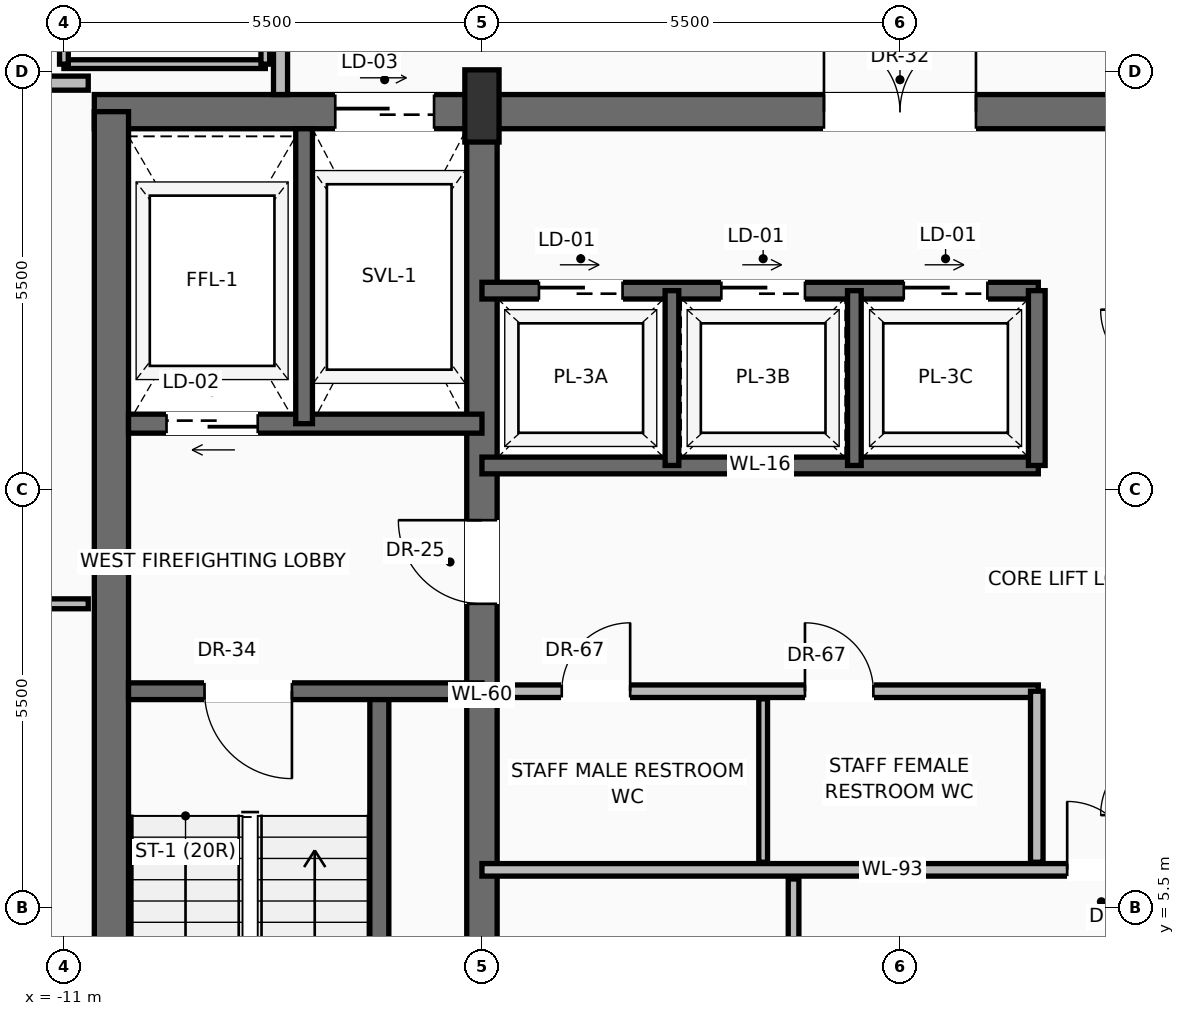
"""IFC4 building model, lengths in metres.
Left out: names, types, materials, properties, quantities, classifications, styles, units other than length and angle.
Written with IfcOpenShell. Run it as: python <this file> out.ifc"""

import sys

from ifc_helpers import new_model, si_unit, direction, frame, frame_2d, origin, origin_2d, place, context, subcontext, project, spatial, rectangle, extrude, source, transform, mapped, element, fill, save


model = new_model("IFC4")
c1 = context("Model", 3, precision=1e-05, world=origin(), true_north=direction((0.0, 1.0)))
c2 = subcontext(c1, "Body", "Model", "MODEL_VIEW")
j1 = project(units=[si_unit("LENGTHUNIT", "METRE"), si_unit("PLANEANGLEUNIT", "RADIAN")], contexts=[c1])
p1 = place(None, origin())
s1 = spatial("IfcSite", under=j1, at=p1, CompositionType="ELEMENT")
p2 = place(p1, origin())
s2 = spatial("IfcBuilding", under=s1, at=p2, CompositionType="ELEMENT")
p3 = place(p2, frame((0.0, 0.0, 297.15)))
s3 = spatial("IfcBuildingStorey", under=s2, at=p3, CompositionType="ELEMENT", Elevation=297.15)
p4 = place(p3, frame((-10.6, 15.975, 0.0), z_axis=(0.0, 0.0, 1.0), x_axis=(1.0, 0.0, 0.0)))
e1 = element("IfcWall", 1, at=p4, inside=s3, PredefinedType="SHEAR", context=c2, shape_type="SweptSolid", body=[
    extrude(rectangle(XDim=21.2, YDim=0.45, at=frame_2d((10.6, 0.0))), origin(), (0.0, 0.0, 1.0), 3.24),
])
p5 = place(p4, frame((3.17, 0.0, 0.0)))
e2 = element("IfcOpeningElement", 2, at=p5, cuts=e1, PredefinedType="OPENING", context=c2, shape_type="SweptSolid", body=[
    extrude(rectangle(XDim=1.3, YDim=2.3, at=frame_2d((0.65, 1.15))), frame((0.0, 0.235, 0.0), z_axis=(0.0, -1.0, 0.0), x_axis=(1.0, 0.0, 0.0)), (0.0, 0.0, 1.0), 0.47),
])
p6 = place(p4, frame((9.6, 0.0, 0.0)))
e3 = element("IfcOpeningElement", 3, at=p6, cuts=e1, PredefinedType="OPENING", context=c2, shape_type="SweptSolid", body=[
    extrude(rectangle(XDim=2.0, YDim=2.4, at=frame_2d((1.0, 1.2))), frame((0.0, 0.235, 0.0), z_axis=(0.0, -1.0, 0.0), x_axis=(1.0, 0.0, 0.0)), (0.0, 0.0, 1.0), 0.47),
])
p7 = place(p3, frame((-10.375, 0.625, 0.0), z_axis=(0.0, 0.0, 1.0), x_axis=(0.0, 1.0, 0.0)))
e4 = element("IfcWall", 4, at=p7, inside=s3, PredefinedType="SHEAR", context=c2, shape_type="SweptSolid", body=[
    extrude(rectangle(XDim=15.35, YDim=0.45, at=frame_2d((7.675, 0.0))), origin(), (0.0, 0.0, 1.0), 3.24),
])
p8 = place(p3, frame((-5.5, 0.625, 0.0), z_axis=(0.0, 0.0, 1.0), x_axis=(0.0, 1.0, 0.0)))
e5 = element("IfcWall", 5, at=p8, inside=s3, PredefinedType="SHEAR", context=c2, shape_type="SweptSolid", body=[
    extrude(rectangle(XDim=15.35, YDim=0.4, at=frame_2d((7.675, 0.0))), origin(), (0.0, 0.0, 1.0), 3.24),
])
p9 = place(p8, frame((8.875, 0.0, 0.0)))
e6 = element("IfcOpeningElement", 6, at=p9, cuts=e5, PredefinedType="OPENING", context=c2, shape_type="SweptSolid", body=[
    extrude(rectangle(XDim=1.1, YDim=2.2, at=frame_2d((0.55, 1.1))), frame((0.0, 0.21, 0.0), z_axis=(0.0, -1.0, 0.0), x_axis=(1.0, 0.0, 0.0)), (0.0, 0.0, 1.0), 0.42),
])
m1 = source(origin(), c2, "Body", "SweptSolid", [
    extrude(rectangle(XDim=0.45, YDim=0.95, at=origin_2d()), origin(), (0.0, 0.0, 1.0), 3.45),
])
p10 = place(p3, frame((-5.5, 16.05, 0.0), z_axis=(0.0, 0.0, 1.0), x_axis=(1.0, 0.0, 0.0)))
e7 = element("IfcColumn", 7, at=p10, inside=s3, PredefinedType="PILASTER", context=c2, shape_type="MappedRepresentation", body=[
    mapped(m1, transform((0.0, 0.0, 0.0), scale=1.0)),
])
p11 = place(p3, frame((-17.857, 13.76, 0.0), z_axis=(0.0, 0.0, 1.0), x_axis=(0.497115564006, 0.867684341234, 0.0)))
e8 = element("IfcWall", 8, at=p11, inside=s3, PredefinedType="SOLIDWALL", context=c2, shape_type="SweptSolid", body=[
    extrude(rectangle(XDim=20.373, YDim=0.28, at=frame_2d((10.187, 0.0))), origin(), (0.0, 0.0, 1.0), 2.82),
])
p12 = place(p11, frame((4.889, 0.0, 0.0)))
e9 = element("IfcOpeningElement", 9, at=p12, cuts=e8, PredefinedType="OPENING", context=c2, shape_type="SweptSolid", body=[
    extrude(rectangle(XDim=1.6, YDim=2.35, at=frame_2d((0.8, 1.175))), frame((0.0, 0.15, 0.0), z_axis=(0.0, -1.0, 0.0), x_axis=(1.0, 0.0, 0.0)), (0.0, 0.0, 1.0), 0.3),
])
p13 = place(p11, frame((13.854, 0.0, 0.9)))
e10 = element("IfcOpeningElement", 10, at=p13, cuts=e8, PredefinedType="OPENING", context=c2, shape_type="SweptSolid", body=[
    extrude(rectangle(XDim=2.0, YDim=1.75, at=frame_2d((1.0, 0.875))), frame((0.0, 0.15, 0.0), z_axis=(0.0, -1.0, 0.0), x_axis=(1.0, 0.0, 0.0)), (0.0, 0.0, 1.0), 0.3),
])
p14 = place(p3, frame((-6.85, 0.85, 0.0), z_axis=(0.0, 0.0, 1.0), x_axis=(0.0, 1.0, 0.0)))
e11 = element("IfcWall", 11, at=p14, inside=s3, PredefinedType="SOLIDWALL", context=c2, shape_type="SweptSolid", body=[
    extrude(rectangle(XDim=7.5, YDim=0.25, at=frame_2d((3.75, 0.0))), origin(), (0.0, 0.0, 1.0), 3.24),
])
p15 = place(p3, frame((-5.5, 8.35, 0.0), z_axis=(0.0, 0.0, 1.0), x_axis=(-1.0, 0.0, 0.0)))
e12 = element("IfcWall", 12, at=p15, inside=s3, PredefinedType="SOLIDWALL", context=c2, shape_type="SweptSolid", body=[
    extrude(rectangle(XDim=4.65, YDim=0.22, at=frame_2d((2.325, 0.0))), origin(), (0.0, 0.0, 1.0), 3.24),
])
p16 = place(p15, frame((2.5, 0.0, 0.0)))
e13 = element("IfcOpeningElement", 13, at=p16, cuts=e12, PredefinedType="OPENING", context=c2, shape_type="SweptSolid", body=[
    extrude(rectangle(XDim=1.15, YDim=2.2, at=frame_2d((0.575, 1.1))), frame((0.0, 0.12, 0.0), z_axis=(0.0, -1.0, 0.0), x_axis=(1.0, 0.0, 0.0)), (0.0, 0.0, 1.0), 0.24),
])
p17 = place(p3, frame((-5.5, 11.87, 0.0), z_axis=(0.0, 0.0, 1.0), x_axis=(-1.0, 0.0, 0.0)))
e14 = element("IfcWall", 14, at=p17, inside=s3, PredefinedType="SOLIDWALL", context=c2, shape_type="SweptSolid", body=[
    extrude(rectangle(XDim=4.65, YDim=0.25, at=frame_2d((2.325, 0.0))), origin(), (0.0, 0.0, 1.0), 3.24),
])
p18 = place(p17, frame((2.95, 0.0, 0.0)))
e15 = element("IfcOpeningElement", 15, at=p18, cuts=e14, PredefinedType="OPENING", context=c2, shape_type="SweptSolid", body=[
    extrude(rectangle(XDim=1.2, YDim=2.25, at=frame_2d((0.6, 1.125))), frame((0.0, 0.135, 0.0), z_axis=(0.0, -1.0, 0.0), x_axis=(1.0, 0.0, 0.0)), (0.0, 0.0, 1.0), 0.27),
])
p19 = place(p3, frame((-7.84, 11.87, 0.0), z_axis=(0.0, 0.0, 1.0), x_axis=(0.0, 1.0, 0.0)))
e16 = element("IfcWall", 16, at=p19, inside=s3, PredefinedType="SOLIDWALL", context=c2, shape_type="SweptSolid", body=[
    extrude(rectangle(XDim=3.88, YDim=0.22, at=frame_2d((1.94, 0.0))), origin(), (0.0, 0.0, 1.0), 3.24),
])
p20 = place(p3, frame((-5.5, 6.0, 0.0), z_axis=(0.0, 0.0, 1.0), x_axis=(1.0, 0.0, 0.0)))
e17 = element("IfcWall", 17, at=p20, inside=s3, PredefinedType="PARTITIONING", context=c2, shape_type="SweptSolid", body=[
    extrude(rectangle(XDim=10.8, YDim=0.165, at=frame_2d((5.4, 0.0))), origin(), (0.0, 0.0, 1.0), 3.232),
])
p21 = place(p20, frame((7.7, 0.0, 0.0)))
e18 = element("IfcOpeningElement", 18, at=p21, cuts=e17, PredefinedType="OPENING", context=c2, shape_type="SweptSolid", body=[
    extrude(rectangle(XDim=0.9, YDim=2.1, at=frame_2d((0.45, 1.05))), frame((0.0, 0.093, 0.0), z_axis=(0.0, -1.0, 0.0), x_axis=(1.0, 0.0, 0.0)), (0.0, 0.0, 1.0), 0.185),
])
p22 = place(p3, frame((-1.4, 0.85, 0.0), z_axis=(0.0, 0.0, 1.0), x_axis=(0.0, 1.0, 0.0)))
e19 = element("IfcWall", 19, at=p22, inside=s3, PredefinedType="PARTITIONING", context=c2, shape_type="SweptSolid", body=[
    extrude(rectangle(XDim=5.03, YDim=0.14, at=frame_2d((2.515, 0.0))), origin(), (0.0, 0.0, 1.0), 3.232),
])
p23 = place(p22, frame((2.1, 0.0, 0.0)))
e20 = element("IfcOpeningElement", 20, at=p23, cuts=e19, PredefinedType="OPENING", context=c2, shape_type="SweptSolid", body=[
    extrude(rectangle(XDim=0.9, YDim=2.1, at=frame_2d((0.45, 1.05))), frame((0.0, 0.08, 0.0), z_axis=(0.0, -1.0, 0.0), x_axis=(1.0, 0.0, 0.0)), (0.0, 0.0, 1.0), 0.16),
])
p24 = place(p3, frame((-5.3, 8.35, 0.0), z_axis=(0.0, 0.0, 1.0), x_axis=(1.0, 0.0, 0.0)))
e21 = element("IfcWall", 21, at=p24, inside=s3, PredefinedType="PARTITIONING", context=c2, shape_type="SweptSolid", body=[
    extrude(rectangle(XDim=7.12, YDim=0.165, at=frame_2d((3.56, 0.0))), origin(), (0.0, 0.0, 1.0), 3.232),
])
p25 = place(p24, frame((0.85, 0.0, 0.0)))
e22 = element("IfcOpeningElement", 22, at=p25, cuts=e21, PredefinedType="OPENING", context=c2, shape_type="SweptSolid", body=[
    extrude(rectangle(XDim=0.9, YDim=2.1, at=frame_2d((0.45, 1.05))), frame((0.0, 0.093, 0.0), z_axis=(0.0, -1.0, 0.0), x_axis=(1.0, 0.0, 0.0)), (0.0, 0.0, 1.0), 0.185),
])
p26 = place(p24, frame((4.05, 0.0, 0.0)))
e23 = element("IfcOpeningElement", 23, at=p26, cuts=e21, PredefinedType="OPENING", context=c2, shape_type="SweptSolid", body=[
    extrude(rectangle(XDim=0.9, YDim=2.1, at=frame_2d((0.45, 1.05))), frame((0.0, 0.093, 0.0), z_axis=(0.0, -1.0, 0.0), x_axis=(1.0, 0.0, 0.0)), (0.0, 0.0, 1.0), 0.185),
])
p27 = place(p3, frame((1.8, 6.1, 0.0), z_axis=(0.0, 0.0, 1.0), x_axis=(0.0, 1.0, 0.0)))
e24 = element("IfcWall", 24, at=p27, inside=s3, PredefinedType="PARTITIONING", context=c2, shape_type="SweptSolid", body=[
    extrude(rectangle(XDim=2.25, YDim=0.165, at=frame_2d((1.125, 0.0))), origin(), (0.0, 0.0, 1.0), 3.232),
])
p28 = place(p3, frame((-1.8, 6.1, 0.0), z_axis=(0.0, 0.0, 1.0), x_axis=(0.0, 1.0, 0.0)))
e25 = element("IfcWall", 25, at=p28, inside=s3, PredefinedType="PARTITIONING", context=c2, shape_type="SweptSolid", body=[
    extrude(rectangle(XDim=2.15, YDim=0.115, at=frame_2d((1.075, 0.0))), origin(), (0.0, 0.0, 1.0), 3.232),
])
p29 = place(p3, frame((-5.5, 11.32, 0.0), z_axis=(0.0, 0.0, 1.0), x_axis=(1.0, 0.0, 0.0)))
e26 = element("IfcWall", 26, at=p29, inside=s3, PredefinedType="SOLIDWALL", context=c2, shape_type="SweptSolid", body=[
    extrude(rectangle(XDim=7.32, YDim=0.22, at=frame_2d((3.66, 0.0))), origin(), (0.0, 0.0, 1.0), 3.24),
])
p30 = place(p3, frame((-5.5, 13.62, 0.0), z_axis=(0.0, 0.0, 1.0), x_axis=(1.0, 0.0, 0.0)))
e27 = element("IfcWall", 27, at=p30, inside=s3, PredefinedType="SOLIDWALL", context=c2, shape_type="SweptSolid", body=[
    extrude(rectangle(XDim=7.32, YDim=0.22, at=frame_2d((3.66, 0.0))), origin(), (0.0, 0.0, 1.0), 3.24),
])
p31 = place(p30, frame((0.75, 0.0, 0.0)))
e28 = element("IfcOpeningElement", 28, at=p31, cuts=e27, PredefinedType="OPENING", context=c2, shape_type="SweptSolid", body=[
    extrude(rectangle(XDim=1.1, YDim=2.2, at=frame_2d((0.55, 1.1))), frame((0.0, 0.12, 0.0), z_axis=(0.0, -1.0, 0.0), x_axis=(1.0, 0.0, 0.0)), (0.0, 0.0, 1.0), 0.24),
])
p32 = place(p30, frame((3.15, 0.0, 0.0)))
e29 = element("IfcOpeningElement", 29, at=p32, cuts=e27, PredefinedType="OPENING", context=c2, shape_type="SweptSolid", body=[
    extrude(rectangle(XDim=1.1, YDim=2.2, at=frame_2d((0.55, 1.1))), frame((0.0, 0.12, 0.0), z_axis=(0.0, -1.0, 0.0), x_axis=(1.0, 0.0, 0.0)), (0.0, 0.0, 1.0), 0.24),
])
p33 = place(p30, frame((5.55, 0.0, 0.0)))
e30 = element("IfcOpeningElement", 30, at=p33, cuts=e27, PredefinedType="OPENING", context=c2, shape_type="SweptSolid", body=[
    extrude(rectangle(XDim=1.1, YDim=2.2, at=frame_2d((0.55, 1.1))), frame((0.0, 0.12, 0.0), z_axis=(0.0, -1.0, 0.0), x_axis=(1.0, 0.0, 0.0)), (0.0, 0.0, 1.0), 0.24),
])
p34 = place(p3, frame((1.8, 11.32, 0.0), z_axis=(0.0, 0.0, 1.0), x_axis=(0.0, 1.0, 0.0)))
e31 = element("IfcWall", 31, at=p34, inside=s3, PredefinedType="SOLIDWALL", context=c2, shape_type="SweptSolid", body=[
    extrude(rectangle(XDim=2.3, YDim=0.22, at=frame_2d((1.15, 0.0))), origin(), (0.0, 0.0, 1.0), 3.24),
])
for number, where, z_axis, x_axis in (
    (32, (-3.0, 11.32, 0.0), (0.0, 0.0, 1.0), (0.0, 1.0, 0.0)),
    (33, (-0.6, 11.32, 0.0), (0.0, 0.0, 1.0), (0.0, 1.0, 0.0)),
):
    element("IfcWall", number, at=place(p3, frame(where, z_axis=z_axis, x_axis=x_axis)), inside=s3, PredefinedType="SOLIDWALL", context=c2, shape_type="SweptSolid", body=[
        extrude(rectangle(XDim=2.3, YDim=0.18, at=frame_2d((1.15, 0.0))), origin(), (0.0, 0.0, 1.0), 3.24),
    ])
p35 = place(p3, frame((-8.15, 16.2, 0.0), z_axis=(0.0, 0.0, 1.0), x_axis=(0.0, 1.0, 0.0)))
e34 = element("IfcWall", 34, at=p35, inside=s3, PredefinedType="PARTITIONING", context=c2, shape_type="SweptSolid", body=[
    extrude(rectangle(XDim=13.6, YDim=0.185, at=frame_2d((6.8, 0.0))), origin(), (0.0, 0.0, 1.0), 3.232),
])
p36 = place(p35, frame((3.235, 0.0, 0.0)))
e35 = element("IfcOpeningElement", 35, at=p36, cuts=e34, PredefinedType="OPENING", context=c2, shape_type="SweptSolid", body=[
    extrude(rectangle(XDim=1.05, YDim=2.25, at=frame_2d((0.525, 1.125))), frame((0.0, 0.103, 0.0), z_axis=(0.0, -1.0, 0.0), x_axis=(1.0, 0.0, 0.0)), (0.0, 0.0, 1.0), 0.205),
])
p37 = place(p35, frame((10.123, 0.0, 0.0)))
e36 = element("IfcOpeningElement", 36, at=p37, cuts=e34, PredefinedType="OPENING", context=c2, shape_type="SweptSolid", body=[
    extrude(rectangle(XDim=1.05, YDim=2.25, at=frame_2d((0.525, 1.125))), frame((0.0, 0.103, 0.0), z_axis=(0.0, -1.0, 0.0), x_axis=(1.0, 0.0, 0.0)), (0.0, 0.0, 1.0), 0.205),
])
p38 = place(p3, frame((-16.523, 16.35, 0.0), z_axis=(0.0, 0.0, 1.0), x_axis=(1.0, 0.0, 0.0)))
e37 = element("IfcWall", 37, at=p38, inside=s3, PredefinedType="PARTITIONING", context=c2, shape_type="SweptSolid", body=[
    extrude(rectangle(XDim=5.843, YDim=0.185, at=frame_2d((2.921, 0.0))), origin(), (0.0, 0.0, 1.0), 3.232),
])
p39 = place(p38, frame((3.171, 0.0, 0.0)))
e38 = element("IfcOpeningElement", 38, at=p39, cuts=e37, PredefinedType="OPENING", context=c2, shape_type="SweptSolid", body=[
    extrude(rectangle(XDim=1.05, YDim=2.25, at=frame_2d((0.525, 1.125))), frame((0.0, 0.103, 0.0), z_axis=(0.0, -1.0, 0.0), x_axis=(1.0, 0.0, 0.0)), (0.0, 0.0, 1.0), 0.205),
])
p40 = place(p3, frame((-20.448, 9.5, 0.0), z_axis=(0.0, 0.0, 1.0), x_axis=(1.0, 0.0, 0.0)))
e39 = element("IfcWall", 39, at=p40, inside=s3, PredefinedType="PARTITIONING", context=c2, shape_type="SweptSolid", body=[
    extrude(rectangle(XDim=9.768, YDim=0.13, at=frame_2d((4.884, 0.0))), origin(), (0.0, 0.0, 1.0), 3.232),
])
p41 = place(p40, frame((3.954, 0.0, 0.0)))
e40 = element("IfcOpeningElement", 40, at=p41, cuts=e39, PredefinedType="OPENING", context=c2, shape_type="SweptSolid", body=[
    extrude(rectangle(XDim=0.95, YDim=2.2, at=frame_2d((0.475, 1.1))), frame((0.0, 0.075, 0.0), z_axis=(0.0, -1.0, 0.0), x_axis=(1.0, 0.0, 0.0)), (0.0, 0.0, 1.0), 0.15),
])
p42 = place(p3, frame((-11.0, 16.6, 0.0), z_axis=(0.0, 0.0, 1.0), x_axis=(1.0, 0.0, 0.0)))
e41 = element("IfcWall", 41, at=p42, inside=s3, PredefinedType="PARTITIONING", context=c2, shape_type="SweptSolid", body=[
    extrude(rectangle(XDim=2.65, YDim=0.115, at=frame_2d((1.325, 0.0))), origin(), (0.0, 0.0, 1.0), 3.232),
])
p43 = place(p3, frame((-11.0, 16.6, 0.0), z_axis=(0.0, 0.0, 1.0), x_axis=(0.0, 1.0, 0.0)))
e42 = element("IfcWall", 42, at=p43, inside=s3, PredefinedType="PARTITIONING", context=c2, shape_type="SweptSolid", body=[
    extrude(rectangle(XDim=2.4, YDim=0.115, at=frame_2d((1.2, 0.0))), origin(), (0.0, 0.0, 1.0), 3.232),
])
p44 = place(p43, frame((0.75, 0.0, 0.0)))
e43 = element("IfcOpeningElement", 43, at=p44, cuts=e42, PredefinedType="OPENING", context=c2, shape_type="SweptSolid", body=[
    extrude(rectangle(XDim=0.9, YDim=2.15, at=frame_2d((0.45, 1.075))), frame((0.0, 0.067, 0.0), z_axis=(0.0, -1.0, 0.0), x_axis=(1.0, 0.0, 0.0)), (0.0, 0.0, 1.0), 0.135),
])
p45 = place(p3, frame((-8.35, 16.6, 0.0), z_axis=(0.0, 0.0, 1.0), x_axis=(0.0, 1.0, 0.0)))
e44 = element("IfcWall", 44, at=p45, inside=s3, PredefinedType="PARTITIONING", context=c2, shape_type="SweptSolid", body=[
    extrude(rectangle(XDim=2.4, YDim=0.115, at=frame_2d((1.2, 0.0))), origin(), (0.0, 0.0, 1.0), 3.232),
])
m2 = source(origin(), c2, "Body", "SweptSolid", [
    extrude(rectangle(XDim=1.15, YDim=2.2, at=frame_2d((0.575, 1.1))), frame((0.0, 0.025, 0.0), z_axis=(0.0, -1.0, 0.0), x_axis=(1.0, 0.0, 0.0)), (0.0, 0.0, 1.0), 0.05),
])
p46 = place(p16, origin())
e45 = element("IfcDoor", 45, at=p46, inside=s3, OperationType="SINGLE_SWING_LEFT", PredefinedType="DOOR", context=c2, shape_type="MappedRepresentation", body=[
    mapped(m2, transform((0.0, 0.0, 0.0), scale=1.0)),
])
fill(e13, e45)
m3 = source(origin(), c2, "Body", "SweptSolid", [
    extrude(rectangle(XDim=1.1, YDim=2.2, at=frame_2d((0.55, 1.1))), frame((0.0, 0.025, 0.0), z_axis=(0.0, -1.0, 0.0), x_axis=(1.0, 0.0, 0.0)), (0.0, 0.0, 1.0), 0.05),
])
p47 = place(p9, origin())
e46 = element("IfcDoor", 46, at=p47, inside=s3, OperationType="SINGLE_SWING_RIGHT", PredefinedType="DOOR", context=c2, shape_type="MappedRepresentation", body=[
    mapped(m3, transform((0.0, 0.0, 0.0), scale=1.0)),
])
fill(e6, e46)
m4 = source(origin(), c2, "Body", "SweptSolid", [
    extrude(rectangle(XDim=1.2, YDim=2.25, at=frame_2d((0.6, 1.125))), frame((0.0, 0.025, 0.0), z_axis=(0.0, -1.0, 0.0), x_axis=(1.0, 0.0, 0.0)), (0.0, 0.0, 1.0), 0.05),
])
p48 = place(p18, origin())
e47 = element("IfcDoor", 47, at=p48, inside=s3, OperationType="SLIDING_TO_LEFT", PredefinedType="DOOR", context=c2, shape_type="MappedRepresentation", body=[
    mapped(m4, transform((0.0, 0.0, 0.0), scale=1.0)),
])
fill(e15, e47)
m5 = source(origin(), c2, "Body", "SweptSolid", [
    extrude(rectangle(XDim=1.3, YDim=2.3, at=frame_2d((0.65, 1.15))), frame((0.0, 0.025, 0.0), z_axis=(0.0, -1.0, 0.0), x_axis=(1.0, 0.0, 0.0)), (0.0, 0.0, 1.0), 0.05),
])
p49 = place(p5, origin())
e48 = element("IfcDoor", 48, at=p49, inside=s3, OperationType="SLIDING_TO_RIGHT", PredefinedType="DOOR", context=c2, shape_type="MappedRepresentation", body=[
    mapped(m5, transform((0.0, 0.0, 0.0), scale=1.0)),
])
fill(e2, e48)
m6 = source(origin(), c2, "Body", "SweptSolid", [
    extrude(rectangle(XDim=2.0, YDim=2.4, at=frame_2d((1.0, 1.2))), frame((0.0, 0.025, 0.0), z_axis=(0.0, -1.0, 0.0), x_axis=(1.0, 0.0, 0.0)), (0.0, 0.0, 1.0), 0.05),
])
p50 = place(p6, origin())
e49 = element("IfcDoor", 49, at=p50, inside=s3, OperationType="DOUBLE_DOOR_SINGLE_SWING", PredefinedType="DOOR", context=c2, shape_type="MappedRepresentation", body=[
    mapped(m6, transform((0.0, 0.0, 0.0), scale=1.0)),
])
fill(e3, e49)
m7 = source(origin(), c2, "Body", "SweptSolid", [
    extrude(rectangle(XDim=0.9, YDim=2.1, at=frame_2d((0.45, 1.05))), frame((0.0, 0.025, 0.0), z_axis=(0.0, -1.0, 0.0), x_axis=(1.0, 0.0, 0.0)), (0.0, 0.0, 1.0), 0.05),
])
p51 = place(p21, origin())
e50 = element("IfcDoor", 50, at=p51, inside=s3, OperationType="SINGLE_SWING_LEFT", PredefinedType="DOOR", context=c2, shape_type="MappedRepresentation", body=[
    mapped(m7, transform((0.0, 0.0, 0.0), scale=1.0)),
])
fill(e18, e50)
p52 = place(p25, origin())
e51 = element("IfcDoor", 51, at=p52, inside=s3, OperationType="SINGLE_SWING_RIGHT", PredefinedType="DOOR", context=c2, shape_type="MappedRepresentation", body=[
    mapped(m7, transform((0.0, 0.0, 0.0), scale=1.0)),
])
fill(e22, e51)
p53 = place(p26, origin())
e52 = element("IfcDoor", 52, at=p53, inside=s3, OperationType="SINGLE_SWING_LEFT", PredefinedType="DOOR", context=c2, shape_type="MappedRepresentation", body=[
    mapped(m7, transform((0.0, 0.0, 0.0), scale=1.0)),
])
fill(e23, e52)
m8 = source(origin(), c2, "Body", "SweptSolid", [
    extrude(rectangle(XDim=1.1, YDim=2.2, at=frame_2d((0.55, 1.1))), frame((0.0, 0.025, 0.0), z_axis=(0.0, -1.0, 0.0), x_axis=(1.0, 0.0, 0.0)), (0.0, 0.0, 1.0), 0.05),
])
p54 = place(p31, origin())
e53 = element("IfcDoor", 53, at=p54, inside=s3, OperationType="SLIDING_TO_RIGHT", PredefinedType="DOOR", context=c2, shape_type="MappedRepresentation", body=[
    mapped(m8, transform((0.0, 0.0, 0.0), scale=1.0)),
])
fill(e28, e53)
p55 = place(p32, origin())
e54 = element("IfcDoor", 54, at=p55, inside=s3, OperationType="SLIDING_TO_RIGHT", PredefinedType="DOOR", context=c2, shape_type="MappedRepresentation", body=[
    mapped(m8, transform((0.0, 0.0, 0.0), scale=1.0)),
])
fill(e29, e54)
p56 = place(p33, origin())
e55 = element("IfcDoor", 55, at=p56, inside=s3, OperationType="SLIDING_TO_RIGHT", PredefinedType="DOOR", context=c2, shape_type="MappedRepresentation", body=[
    mapped(m8, transform((0.0, 0.0, 0.0), scale=1.0)),
])
fill(e30, e55)
save(model, sys.argv[1])
